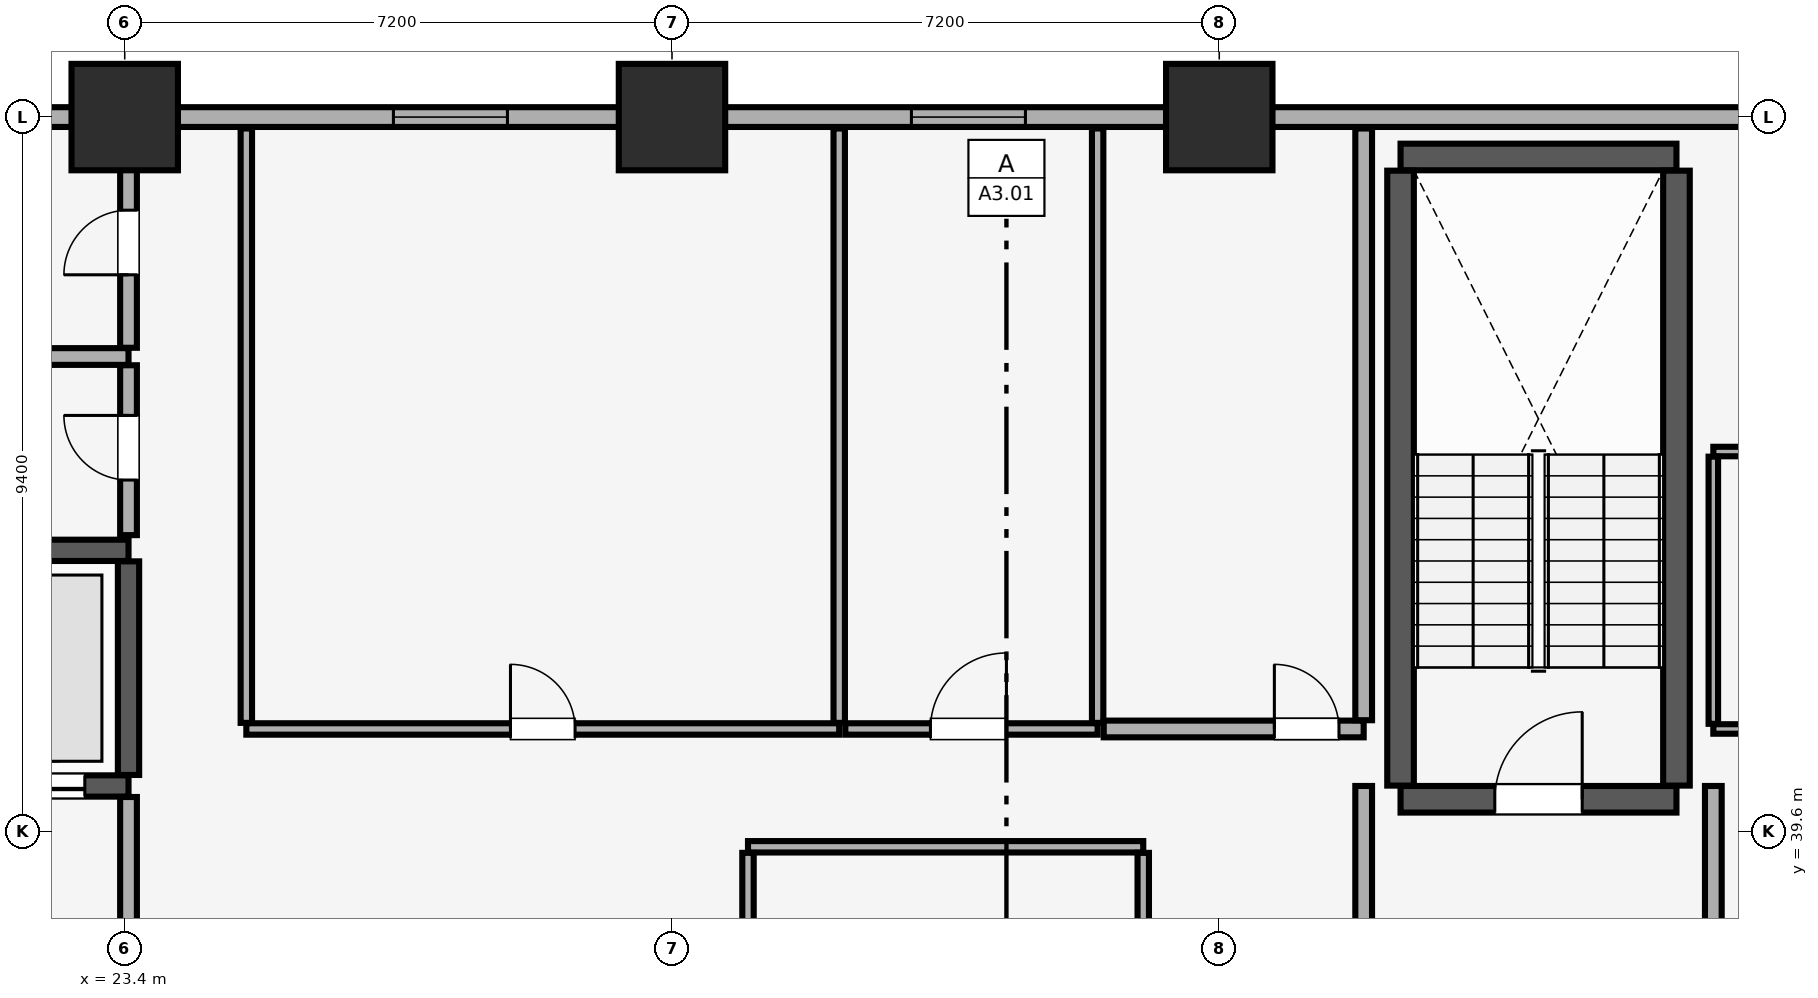
"""IFC4 building model, lengths in metres.
Left out: names, types, materials, properties, quantities, classifications, styles, units other than length and angle.
Written with IfcOpenShell. Run it as: python <this file> out.ifc"""

import sys

from ifc_helpers import new_model, si_unit, direction, frame, frame_2d, origin, origin_2d, place, context, subcontext, project, spatial, rectangle, extrude, element, fill, save


model = new_model("IFC4")
c1 = context("Model", 3, precision=1e-05, world=origin(), true_north=direction((0.0, 1.0)))
c2 = subcontext(c1, "Body", "Model", "MODEL_VIEW")
j1 = project(units=[si_unit("LENGTHUNIT", "METRE"), si_unit("PLANEANGLEUNIT", "RADIAN")], contexts=[c1])
p1 = place(None, origin())
s1 = spatial("IfcSite", under=j1, at=p1, CompositionType="ELEMENT")
p2 = place(p1, origin())
s2 = spatial("IfcBuilding", under=s1, at=p2, CompositionType="ELEMENT")
p3 = place(p2, frame((0.0, 0.0, 46.4)))
s3 = spatial("IfcBuildingStorey", under=s2, at=p3, CompositionType="ELEMENT", Elevation=46.4)
for number, where, z_axis, x_axis in (
    (1, (23.4, 49.0, 0.0), (0.0, 0.0, 1.0), (1.0, 0.0, 0.0)),
    (2, (30.6, 49.0, 0.0), (0.0, 0.0, 1.0), (1.0, 0.0, 0.0)),
    (3, (37.8, 49.0, 0.0), (0.0, 0.0, 1.0), (1.0, 0.0, 0.0)),
):
    element("IfcColumn", number, at=place(p3, frame(where, z_axis=z_axis, x_axis=x_axis)), inside=s3, PredefinedType="COLUMN", context=c2, shape_type="SweptSolid", body=[
        extrude(rectangle(XDim=1.4, YDim=1.4, at=origin_2d()), origin(), (0.0, 0.0, 1.0), 3.51),
    ])
p4 = place(p3, frame((79.8, 49.0, 0.0), z_axis=(0.0, 0.0, 1.0), x_axis=(-1.0, 0.0, 0.0)))
e4 = element("IfcWall", 4, at=p4, inside=s3, PredefinedType="SOLIDWALL", context=c2, shape_type="SweptSolid", body=[
    extrude(rectangle(XDim=75.6, YDim=0.26, at=frame_2d((37.8, 0.0))), origin(), (0.0, 0.0, 1.0), 2.56),
])
p5 = place(p4, frame((72.565, 0.0, 0.85)))
e5 = element("IfcOpeningElement", 5, at=p5, cuts=e4, PredefinedType="OPENING", context=c2, shape_type="SweptSolid", body=[
    extrude(rectangle(XDim=1.5, YDim=1.4, at=frame_2d((0.75, 0.7))), frame((0.0, 0.14, 0.0), z_axis=(0.0, -1.0, 0.0), x_axis=(1.0, 0.0, 0.0)), (0.0, 0.0, 1.0), 0.28),
])
p6 = place(p4, frame((67.45, 0.0, 0.85)))
e6 = element("IfcOpeningElement", 6, at=p6, cuts=e4, PredefinedType="OPENING", context=c2, shape_type="SweptSolid", body=[
    extrude(rectangle(XDim=1.5, YDim=1.4, at=frame_2d((0.75, 0.7))), frame((0.0, 0.14, 0.0), z_axis=(0.0, -1.0, 0.0), x_axis=(1.0, 0.0, 0.0)), (0.0, 0.0, 1.0), 0.28),
])
p7 = place(p4, frame((6.65, 0.0, 0.85)))
e7 = element("IfcOpeningElement", 7, at=p7, cuts=e4, PredefinedType="OPENING", context=c2, shape_type="SweptSolid", body=[
    extrude(rectangle(XDim=1.5, YDim=1.4, at=frame_2d((0.75, 0.7))), frame((0.0, 0.14, 0.0), z_axis=(0.0, -1.0, 0.0), x_axis=(1.0, 0.0, 0.0)), (0.0, 0.0, 1.0), 0.28),
])
p8 = place(p4, frame((1.535, 0.0, 0.85)))
e8 = element("IfcOpeningElement", 8, at=p8, cuts=e4, PredefinedType="OPENING", context=c2, shape_type="SweptSolid", body=[
    extrude(rectangle(XDim=1.5, YDim=1.4, at=frame_2d((0.75, 0.7))), frame((0.0, 0.14, 0.0), z_axis=(0.0, -1.0, 0.0), x_axis=(1.0, 0.0, 0.0)), (0.0, 0.0, 1.0), 0.28),
])
p9 = place(p4, frame((51.365, 0.0, 0.9)))
e9 = element("IfcOpeningElement", 9, at=p9, cuts=e4, PredefinedType="OPENING", context=c2, shape_type="SweptSolid", body=[
    extrude(rectangle(XDim=1.5, YDim=1.4, at=frame_2d((0.75, 0.7))), frame((0.0, 0.14, 0.0), z_axis=(0.0, -1.0, 0.0), x_axis=(1.0, 0.0, 0.0)), (0.0, 0.0, 1.0), 0.28),
])
p10 = place(p4, frame((44.55, 0.0, 0.9)))
e10 = element("IfcOpeningElement", 10, at=p10, cuts=e4, PredefinedType="OPENING", context=c2, shape_type="SweptSolid", body=[
    extrude(rectangle(XDim=1.5, YDim=1.4, at=frame_2d((0.75, 0.7))), frame((0.0, 0.14, 0.0), z_axis=(0.0, -1.0, 0.0), x_axis=(1.0, 0.0, 0.0)), (0.0, 0.0, 1.0), 0.28),
])
p11 = place(p4, frame((28.1, 0.0, 0.9)))
e11 = element("IfcOpeningElement", 11, at=p11, cuts=e4, PredefinedType="OPENING", context=c2, shape_type="SweptSolid", body=[
    extrude(rectangle(XDim=1.5, YDim=1.4, at=frame_2d((0.75, 0.7))), frame((0.0, 0.14, 0.0), z_axis=(0.0, -1.0, 0.0), x_axis=(1.0, 0.0, 0.0)), (0.0, 0.0, 1.0), 0.28),
])
p12 = place(p4, frame((23.485, 0.0, 0.9)))
e12 = element("IfcOpeningElement", 12, at=p12, cuts=e4, PredefinedType="OPENING", context=c2, shape_type="SweptSolid", body=[
    extrude(rectangle(XDim=1.5, YDim=1.4, at=frame_2d((0.75, 0.7))), frame((0.0, 0.14, 0.0), z_axis=(0.0, -1.0, 0.0), x_axis=(1.0, 0.0, 0.0)), (0.0, 0.0, 1.0), 0.28),
])
p13 = place(p3, frame((40.185, 40.025, 0.0), z_axis=(0.0, 0.0, 1.0), x_axis=(1.0, 0.0, 0.0)))
e13 = element("IfcWall", 13, at=p13, inside=s3, PredefinedType="SHEAR", context=c2, shape_type="SweptSolid", body=[
    extrude(rectangle(XDim=3.63, YDim=0.35, at=frame_2d((1.815, 0.0))), origin(), (0.0, 0.0, 1.0), 3.51),
])
p14 = place(p13, frame((1.24, 0.0, 0.0)))
e14 = element("IfcOpeningElement", 14, at=p14, cuts=e13, PredefinedType="OPENING", context=c2, shape_type="SweptSolid", body=[
    extrude(rectangle(XDim=1.15, YDim=2.15, at=frame_2d((0.575, 1.075))), frame((0.0, 0.185, 0.0), z_axis=(0.0, -1.0, 0.0), x_axis=(1.0, 0.0, 0.0)), (0.0, 0.0, 1.0), 0.37),
])
p15 = place(p3, frame((40.185, 48.475, 0.0), z_axis=(0.0, 0.0, 1.0), x_axis=(1.0, 0.0, 0.0)))
e15 = element("IfcWall", 15, at=p15, inside=s3, PredefinedType="SHEAR", context=c2, shape_type="SweptSolid", body=[
    extrude(rectangle(XDim=3.63, YDim=0.35, at=frame_2d((1.815, 0.0))), origin(), (0.0, 0.0, 1.0), 3.51),
])
for number, where, z_axis, x_axis in (
    (16, (40.185, 40.205, 0.0), (0.0, 0.0, 1.0), (0.0, 1.0, 0.0)),
    (17, (43.815, 40.205, 0.0), (0.0, 0.0, 1.0), (0.0, 1.0, 0.0)),
):
    element("IfcWall", number, at=place(p3, frame(where, z_axis=z_axis, x_axis=x_axis)), inside=s3, PredefinedType="SHEAR", context=c2, shape_type="SweptSolid", body=[
        extrude(rectangle(XDim=8.09, YDim=0.35, at=frame_2d((4.045, 0.0))), origin(), (0.0, 0.0, 1.0), 3.51),
    ])
p16 = place(p3, frame((21.035, 40.2, 0.0), z_axis=(0.0, 0.0, 1.0), x_axis=(1.0, 0.0, 0.0)))
e18 = element("IfcWall", 18, at=p16, inside=s3, PredefinedType="SHEAR", context=c2, shape_type="SweptSolid", body=[
    extrude(rectangle(XDim=2.415, YDim=0.28, at=frame_2d((1.208, 0.0))), origin(), (0.0, 0.0, 1.0), 3.51),
])
p17 = place(p16, frame((0.54, 0.0, 0.0)))
e19 = element("IfcOpeningElement", 19, at=p17, cuts=e18, PredefinedType="OPENING", context=c2, shape_type="SweptSolid", body=[
    extrude(rectangle(XDim=1.3, YDim=2.3, at=frame_2d((0.65, 1.15))), frame((0.0, 0.15, 0.0), z_axis=(0.0, -1.0, 0.0), x_axis=(1.0, 0.0, 0.0)), (0.0, 0.0, 1.0), 0.3),
])
p18 = place(p3, frame((21.035, 43.3, 0.0), z_axis=(0.0, 0.0, 1.0), x_axis=(1.0, 0.0, 0.0)))
e20 = element("IfcWall", 20, at=p18, inside=s3, PredefinedType="SHEAR", context=c2, shape_type="SweptSolid", body=[
    extrude(rectangle(XDim=2.415, YDim=0.28, at=frame_2d((1.208, 0.0))), origin(), (0.0, 0.0, 1.0), 3.51),
])
p19 = place(p3, frame((23.45, 40.345, 0.0), z_axis=(0.0, 0.0, 1.0), x_axis=(0.0, 1.0, 0.0)))
e21 = element("IfcWall", 21, at=p19, inside=s3, PredefinedType="SHEAR", context=c2, shape_type="SweptSolid", body=[
    extrude(rectangle(XDim=2.81, YDim=0.28, at=frame_2d((1.405, 0.0))), origin(), (0.0, 0.0, 1.0), 3.51),
])
p20 = place(p3, frame((23.45, 34.415, 0.0), z_axis=(0.0, 0.0, 1.0), x_axis=(0.0, 1.0, 0.0)))
e22 = element("IfcWall", 22, at=p20, inside=s3, PredefinedType="PARTITIONING", context=c2, shape_type="SweptSolid", body=[
    extrude(rectangle(XDim=5.64, YDim=0.22, at=frame_2d((2.82, 0.0))), origin(), (0.0, 0.0, 1.0), 3.51),
])
for number, where, z_axis, x_axis in (
    (23, (39.7, 34.415, 0.0), (0.0, 0.0, 1.0), (0.0, 1.0, 0.0)),
    (24, (44.3, 34.415, 0.0), (0.0, 0.0, 1.0), (0.0, 1.0, 0.0)),
):
    element("IfcWall", number, at=place(p3, frame(where, z_axis=z_axis, x_axis=x_axis)), inside=s3, PredefinedType="PARTITIONING", context=c2, shape_type="SweptSolid", body=[
        extrude(rectangle(XDim=5.785, YDim=0.22, at=frame_2d((2.893, 0.0))), origin(), (0.0, 0.0, 1.0), 3.51),
    ])
p21 = place(p3, frame((21.035, 45.85, 0.0), z_axis=(0.0, 0.0, 1.0), x_axis=(1.0, 0.0, 0.0)))
e25 = element("IfcWall", 25, at=p21, inside=s3, PredefinedType="PARTITIONING", context=c2, shape_type="SweptSolid", body=[
    extrude(rectangle(XDim=2.415, YDim=0.22, at=frame_2d((1.208, 0.0))), origin(), (0.0, 0.0, 1.0), 3.51),
])
p22 = place(p3, frame((23.45, 43.5, 0.0), z_axis=(0.0, 0.0, 1.0), x_axis=(0.0, 1.0, 0.0)))
e26 = element("IfcWall", 26, at=p22, inside=s3, PredefinedType="PARTITIONING", context=c2, shape_type="SweptSolid", body=[
    extrude(rectangle(XDim=2.235, YDim=0.22, at=frame_2d((1.118, 0.0))), origin(), (0.0, 0.0, 1.0), 3.51),
])
p23 = place(p22, frame((0.725, 0.0, 0.0)))
e27 = element("IfcOpeningElement", 27, at=p23, cuts=e26, PredefinedType="OPENING", context=c2, shape_type="SweptSolid", body=[
    extrude(rectangle(XDim=0.85, YDim=2.1, at=frame_2d((0.425, 1.05))), frame((0.0, 0.12, 0.0), z_axis=(0.0, -1.0, 0.0), x_axis=(1.0, 0.0, 0.0)), (0.0, 0.0, 1.0), 0.24),
])
p24 = place(p3, frame((23.45, 45.965, 0.0), z_axis=(0.0, 0.0, 1.0), x_axis=(0.0, 1.0, 0.0)))
e28 = element("IfcWall", 28, at=p24, inside=s3, PredefinedType="PARTITIONING", context=c2, shape_type="SweptSolid", body=[
    extrude(rectangle(XDim=2.885, YDim=0.22, at=frame_2d((1.442, 0.0))), origin(), (0.0, 0.0, 1.0), 3.51),
])
p25 = place(p24, frame((0.96, 0.0, 0.0)))
e29 = element("IfcOpeningElement", 29, at=p25, cuts=e28, PredefinedType="OPENING", context=c2, shape_type="SweptSolid", body=[
    extrude(rectangle(XDim=0.85, YDim=2.1, at=frame_2d((0.425, 1.05))), frame((0.0, 0.12, 0.0), z_axis=(0.0, -1.0, 0.0), x_axis=(1.0, 0.0, 0.0)), (0.0, 0.0, 1.0), 0.24),
])
p26 = place(p3, frame((31.6, 39.4, 0.0), z_axis=(0.0, 0.0, 1.0), x_axis=(1.0, 0.0, 0.0)))
e30 = element("IfcWall", 30, at=p26, inside=s3, PredefinedType="PARTITIONING", context=c2, shape_type="SweptSolid", body=[
    extrude(rectangle(XDim=5.2, YDim=0.15, at=frame_2d((2.6, 0.0))), origin(), (0.0, 0.0, 1.0), 3.51),
])
for number, where, z_axis, x_axis in (
    (31, (31.6, 34.38, 0.0), (0.0, 0.0, 1.0), (0.0, 1.0, 0.0)),
    (32, (36.8, 34.38, 0.0), (0.0, 0.0, 1.0), (0.0, 1.0, 0.0)),
):
    element("IfcWall", number, at=place(p3, frame(where, z_axis=z_axis, x_axis=x_axis)), inside=s3, PredefinedType="PARTITIONING", context=c2, shape_type="SweptSolid", body=[
        extrude(rectangle(XDim=4.94, YDim=0.15, at=frame_2d((2.47, 0.0))), origin(), (0.0, 0.0, 1.0), 3.51),
    ])
p27 = place(p3, frame((25.0, 40.95, 0.0), z_axis=(0.0, 0.0, 1.0), x_axis=(1.0, 0.0, 0.0)))
e33 = element("IfcWall", 33, at=p27, inside=s3, PredefinedType="PARTITIONING", context=c2, shape_type="SweptSolid", body=[
    extrude(rectangle(XDim=7.8, YDim=0.15, at=frame_2d((3.9, 0.0))), origin(), (0.0, 0.0, 1.0), 3.51),
])
p28 = place(p27, frame((3.475, 0.0, 0.0)))
e34 = element("IfcOpeningElement", 34, at=p28, cuts=e33, PredefinedType="OPENING", context=c2, shape_type="SweptSolid", body=[
    extrude(rectangle(XDim=0.85, YDim=2.1, at=frame_2d((0.425, 1.05))), frame((0.0, 0.085, 0.0), z_axis=(0.0, -1.0, 0.0), x_axis=(1.0, 0.0, 0.0)), (0.0, 0.0, 1.0), 0.17),
])
for number, where, z_axis, x_axis in (
    (35, (25.0, 41.03, 0.0), (0.0, 0.0, 1.0), (0.0, 1.0, 0.0)),
    (36, (32.8, 41.03, 0.0), (0.0, 0.0, 1.0), (0.0, 1.0, 0.0)),
):
    element("IfcWall", number, at=place(p3, frame(where, z_axis=z_axis, x_axis=x_axis)), inside=s3, PredefinedType="PARTITIONING", context=c2, shape_type="SweptSolid", body=[
        extrude(rectangle(XDim=7.82, YDim=0.15, at=frame_2d((3.91, 0.0))), origin(), (0.0, 0.0, 1.0), 3.51),
    ])
p29 = place(p3, frame((32.88, 40.95, 0.0), z_axis=(0.0, 0.0, 1.0), x_axis=(1.0, 0.0, 0.0)))
e37 = element("IfcWall", 37, at=p29, inside=s3, PredefinedType="PARTITIONING", context=c2, shape_type="SweptSolid", body=[
    extrude(rectangle(XDim=3.32, YDim=0.15, at=frame_2d((1.66, 0.0))), origin(), (0.0, 0.0, 1.0), 3.51),
])
p30 = place(p29, frame((1.12, 0.0, 0.0)))
e38 = element("IfcOpeningElement", 38, at=p30, cuts=e37, PredefinedType="OPENING", context=c2, shape_type="SweptSolid", body=[
    extrude(rectangle(XDim=1.0, YDim=2.15, at=frame_2d((0.5, 1.075))), frame((0.0, 0.085, 0.0), z_axis=(0.0, -1.0, 0.0), x_axis=(1.0, 0.0, 0.0)), (0.0, 0.0, 1.0), 0.17),
])
p31 = place(p3, frame((36.2, 41.03, 0.0), z_axis=(0.0, 0.0, 1.0), x_axis=(0.0, 1.0, 0.0)))
e39 = element("IfcWall", 39, at=p31, inside=s3, PredefinedType="PARTITIONING", context=c2, shape_type="SweptSolid", body=[
    extrude(rectangle(XDim=7.82, YDim=0.15, at=frame_2d((3.91, 0.0))), origin(), (0.0, 0.0, 1.0), 3.51),
])
p32 = place(p3, frame((36.28, 40.95, 0.0), z_axis=(0.0, 0.0, 1.0), x_axis=(1.0, 0.0, 0.0)))
e40 = element("IfcWall", 40, at=p32, inside=s3, PredefinedType="PARTITIONING", context=c2, shape_type="SweptSolid", body=[
    extrude(rectangle(XDim=3.42, YDim=0.22, at=frame_2d((1.71, 0.0))), origin(), (0.0, 0.0, 1.0), 3.51),
])
p33 = place(p32, frame((2.245, 0.0, 0.0)))
e41 = element("IfcOpeningElement", 41, at=p33, cuts=e40, PredefinedType="OPENING", context=c2, shape_type="SweptSolid", body=[
    extrude(rectangle(XDim=0.85, YDim=2.1, at=frame_2d((0.425, 1.05))), frame((0.0, 0.12, 0.0), z_axis=(0.0, -1.0, 0.0), x_axis=(1.0, 0.0, 0.0)), (0.0, 0.0, 1.0), 0.24),
])
p34 = place(p3, frame((39.7, 41.065, 0.0), z_axis=(0.0, 0.0, 1.0), x_axis=(0.0, 1.0, 0.0)))
e42 = element("IfcWall", 42, at=p34, inside=s3, PredefinedType="PARTITIONING", context=c2, shape_type="SweptSolid", body=[
    extrude(rectangle(XDim=7.785, YDim=0.22, at=frame_2d((3.893, 0.0))), origin(), (0.0, 0.0, 1.0), 3.51),
])
p35 = place(p3, frame((44.3, 40.95, 0.0), z_axis=(0.0, 0.0, 1.0), x_axis=(1.0, 0.0, 0.0)))
e43 = element("IfcWall", 43, at=p35, inside=s3, PredefinedType="PARTITIONING", context=c2, shape_type="SweptSolid", body=[
    extrude(rectangle(XDim=4.6, YDim=0.125, at=frame_2d((2.3, 0.0))), origin(), (0.0, 0.0, 1.0), 3.51),
])
p36 = place(p35, frame((2.85, 0.0, 0.0)))
e44 = element("IfcOpeningElement", 44, at=p36, cuts=e43, PredefinedType="OPENING", context=c2, shape_type="SweptSolid", body=[
    extrude(rectangle(XDim=0.9, YDim=2.1, at=frame_2d((0.45, 1.05))), frame((0.0, 0.073, 0.0), z_axis=(0.0, -1.0, 0.0), x_axis=(1.0, 0.0, 0.0)), (0.0, 0.0, 1.0), 0.145),
])
p37 = place(p3, frame((44.3, 44.6, 0.0), z_axis=(0.0, 0.0, 1.0), x_axis=(1.0, 0.0, 0.0)))
e45 = element("IfcWall", 45, at=p37, inside=s3, PredefinedType="PARTITIONING", context=c2, shape_type="SweptSolid", body=[
    extrude(rectangle(XDim=4.6, YDim=0.125, at=frame_2d((2.3, 0.0))), origin(), (0.0, 0.0, 1.0), 3.51),
])
p38 = place(p3, frame((44.3, 41.018, 0.0), z_axis=(0.0, 0.0, 1.0), x_axis=(0.0, 1.0, 0.0)))
e46 = element("IfcWall", 46, at=p38, inside=s3, PredefinedType="PARTITIONING", context=c2, shape_type="SweptSolid", body=[
    extrude(rectangle(XDim=3.515, YDim=0.125, at=frame_2d((1.757, 0.0))), origin(), (0.0, 0.0, 1.0), 3.51),
])
p39 = place(p9, origin())
e47 = element("IfcWindow", 47, at=p39, inside=s3, PartitioningType="SINGLE_PANEL", PredefinedType="WINDOW", context=c2, shape_type="SweptSolid", body=[
    extrude(rectangle(XDim=1.5, YDim=1.4, at=frame_2d((0.75, 0.7))), frame((0.0, 0.03, 0.0), z_axis=(0.0, -1.0, 0.0), x_axis=(1.0, 0.0, 0.0)), (0.0, 0.0, 1.0), 0.06),
])
fill(e9, e47)
p40 = place(p10, origin())
e48 = element("IfcWindow", 48, at=p40, inside=s3, PartitioningType="SINGLE_PANEL", PredefinedType="WINDOW", context=c2, shape_type="SweptSolid", body=[
    extrude(rectangle(XDim=1.5, YDim=1.4, at=frame_2d((0.75, 0.7))), frame((0.0, 0.03, 0.0), z_axis=(0.0, -1.0, 0.0), x_axis=(1.0, 0.0, 0.0)), (0.0, 0.0, 1.0), 0.06),
])
fill(e10, e48)
p41 = place(p14, origin())
e49 = element("IfcDoor", 49, at=p41, inside=s3, OperationType="SINGLE_SWING_RIGHT", PredefinedType="DOOR", context=c2, shape_type="SweptSolid", body=[
    extrude(rectangle(XDim=1.15, YDim=2.15, at=frame_2d((0.575, 1.075))), frame((0.0, 0.025, 0.0), z_axis=(0.0, -1.0, 0.0), x_axis=(1.0, 0.0, 0.0)), (0.0, 0.0, 1.0), 0.05),
])
fill(e14, e49)
p42 = place(p17, origin())
e50 = element("IfcDoor", 50, at=p42, inside=s3, OperationType="DOUBLE_DOOR_SLIDING", PredefinedType="DOOR", context=c2, shape_type="SweptSolid", body=[
    extrude(rectangle(XDim=1.3, YDim=2.3, at=frame_2d((0.65, 1.15))), frame((0.0, 0.025, 0.0), z_axis=(0.0, -1.0, 0.0), x_axis=(1.0, 0.0, 0.0)), (0.0, 0.0, 1.0), 0.05),
])
fill(e19, e50)
p43 = place(p23, origin())
e51 = element("IfcDoor", 51, at=p43, inside=s3, OperationType="SINGLE_SWING_RIGHT", PredefinedType="DOOR", context=c2, shape_type="SweptSolid", body=[
    extrude(rectangle(XDim=0.85, YDim=2.1, at=frame_2d((0.425, 1.05))), frame((0.0, 0.025, 0.0), z_axis=(0.0, -1.0, 0.0), x_axis=(1.0, 0.0, 0.0)), (0.0, 0.0, 1.0), 0.05),
])
fill(e27, e51)
p44 = place(p25, origin())
e52 = element("IfcDoor", 52, at=p44, inside=s3, OperationType="SINGLE_SWING_LEFT", PredefinedType="DOOR", context=c2, shape_type="SweptSolid", body=[
    extrude(rectangle(XDim=0.85, YDim=2.1, at=frame_2d((0.425, 1.05))), frame((0.0, 0.025, 0.0), z_axis=(0.0, -1.0, 0.0), x_axis=(1.0, 0.0, 0.0)), (0.0, 0.0, 1.0), 0.05),
])
fill(e29, e52)
p45 = place(p28, origin())
e53 = element("IfcDoor", 53, at=p45, inside=s3, OperationType="SINGLE_SWING_LEFT", PredefinedType="DOOR", context=c2, shape_type="SweptSolid", body=[
    extrude(rectangle(XDim=0.85, YDim=2.1, at=frame_2d((0.425, 1.05))), frame((0.0, 0.025, 0.0), z_axis=(0.0, -1.0, 0.0), x_axis=(1.0, 0.0, 0.0)), (0.0, 0.0, 1.0), 0.05),
])
fill(e34, e53)
p46 = place(p30, origin())
e54 = element("IfcDoor", 54, at=p46, inside=s3, OperationType="SINGLE_SWING_RIGHT", PredefinedType="DOOR", context=c2, shape_type="SweptSolid", body=[
    extrude(rectangle(XDim=1.0, YDim=2.15, at=frame_2d((0.5, 1.075))), frame((0.0, 0.025, 0.0), z_axis=(0.0, -1.0, 0.0), x_axis=(1.0, 0.0, 0.0)), (0.0, 0.0, 1.0), 0.05),
])
fill(e38, e54)
p47 = place(p33, origin())
e55 = element("IfcDoor", 55, at=p47, inside=s3, OperationType="SINGLE_SWING_LEFT", PredefinedType="DOOR", context=c2, shape_type="SweptSolid", body=[
    extrude(rectangle(XDim=0.85, YDim=2.1, at=frame_2d((0.425, 1.05))), frame((0.0, 0.025, 0.0), z_axis=(0.0, -1.0, 0.0), x_axis=(1.0, 0.0, 0.0)), (0.0, 0.0, 1.0), 0.05),
])
fill(e41, e55)
save(model, sys.argv[1])
